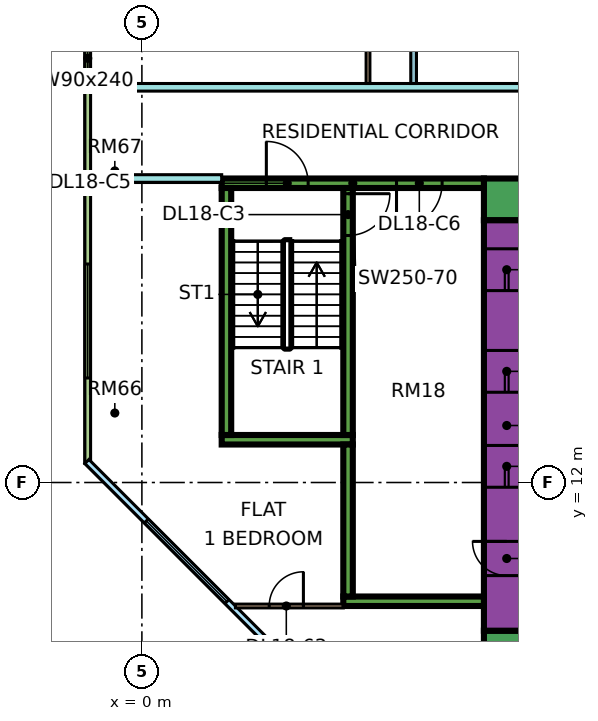
"""IFC4 building model, lengths in metres.
Left out: names, types, materials, properties, quantities, classifications, styles, units other than length and angle.
Written with IfcOpenShell. Run it as: python <this file> out.ifc"""

import sys

from ifc_helpers import new_model, si_unit, direction, frame, frame_2d, origin, place, context, subcontext, project, spatial, rectangle, extrude, element, fill, save


model = new_model("IFC4")
c1 = context("Model", 3, precision=1e-05, world=origin(), true_north=direction((0.0, 1.0)))
c2 = subcontext(c1, "Body", "Model", "MODEL_VIEW")
j1 = project(units=[si_unit("LENGTHUNIT", "METRE"), si_unit("PLANEANGLEUNIT", "RADIAN")], contexts=[c1])
p1 = place(None, origin())
s1 = spatial("IfcSite", under=j1, at=p1, CompositionType="ELEMENT")
p2 = place(p1, origin())
s2 = spatial("IfcBuilding", under=s1, at=p2, CompositionType="ELEMENT")
p3 = place(p2, frame((0.0, 0.0, 82.65)))
s3 = spatial("IfcBuildingStorey", under=s2, at=p3, CompositionType="ELEMENT", Elevation=82.65)
p4 = place(p3, frame((9.0, 7.55, 0.0), z_axis=(0.0, 0.0, 1.0), x_axis=(1.0, 0.0, 0.0)))
e1 = element("IfcWall", 1, at=p4, inside=s3, PredefinedType="SHEAR", context=c2, shape_type="SweptSolid", body=[
    extrude(rectangle(XDim=25.0, YDim=1.1, at=frame_2d((12.5, 0.0))), origin(), (0.0, 0.0, 1.0), 3.75),
])
p5 = place(p3, frame((9.0, 19.45, 0.0), z_axis=(0.0, 0.0, 1.0), x_axis=(1.0, 0.0, 0.0)))
e2 = element("IfcWall", 2, at=p5, inside=s3, PredefinedType="SHEAR", context=c2, shape_type="SweptSolid", body=[
    extrude(rectangle(XDim=25.0, YDim=1.1, at=frame_2d((12.5, 0.0))), origin(), (0.0, 0.0, 1.0), 3.75),
])
p6 = place(p5, frame((19.1, 0.0, 0.0)))
e3 = element("IfcOpeningElement", 3, at=p6, cuts=e2, PredefinedType="OPENING", context=c2, shape_type="SweptSolid", body=[
    extrude(rectangle(XDim=1.8, YDim=2.4, at=frame_2d((0.9, 1.2))), frame((0.0, 0.56, 0.0), z_axis=(0.0, -1.0, 0.0), x_axis=(1.0, 0.0, 0.0)), (0.0, 0.0, 1.0), 1.12),
])
p7 = place(p3, frame((9.6, 8.1, 0.0), z_axis=(0.0, 0.0, 1.0), x_axis=(0.0, 1.0, 0.0)))
e4 = element("IfcWall", 4, at=p7, inside=s3, PredefinedType="SHEAR", context=c2, shape_type="SweptSolid", body=[
    extrude(rectangle(XDim=10.8, YDim=1.2, at=frame_2d((5.4, 0.0))), origin(), (0.0, 0.0, 1.0), 3.75),
])
p8 = place(p7, frame((3.775, 0.0, 0.0)))
e5 = element("IfcOpeningElement", 5, at=p8, cuts=e4, PredefinedType="OPENING", context=c2, shape_type="SweptSolid", body=[
    extrude(rectangle(XDim=1.1, YDim=2.2, at=frame_2d((0.55, 1.1))), frame((0.0, 0.61, 0.0), z_axis=(0.0, -1.0, 0.0), x_axis=(1.0, 0.0, 0.0)), (0.0, 0.0, 1.0), 1.22),
])
p9 = place(p7, frame((6.275, 0.0, 0.0)))
e6 = element("IfcOpeningElement", 6, at=p9, cuts=e4, PredefinedType="OPENING", context=c2, shape_type="SweptSolid", body=[
    extrude(rectangle(XDim=1.1, YDim=2.2, at=frame_2d((0.55, 1.1))), frame((0.0, 0.61, 0.0), z_axis=(0.0, -1.0, 0.0), x_axis=(1.0, 0.0, 0.0)), (0.0, 0.0, 1.0), 1.22),
])
p10 = place(p7, frame((8.95, 0.0, 0.0)))
e7 = element("IfcOpeningElement", 7, at=p10, cuts=e4, PredefinedType="OPENING", context=c2, shape_type="SweptSolid", body=[
    extrude(rectangle(XDim=1.1, YDim=2.2, at=frame_2d((0.55, 1.1))), frame((0.0, 0.61, 0.0), z_axis=(0.0, -1.0, 0.0), x_axis=(1.0, 0.0, 0.0)), (0.0, 0.0, 1.0), 1.22),
])
p11 = place(p7, frame((1.45, 0.0, 0.0)))
e8 = element("IfcOpeningElement", 8, at=p11, cuts=e4, PredefinedType="OPENING", context=c2, shape_type="SweptSolid", body=[
    extrude(rectangle(XDim=0.9, YDim=2.1, at=frame_2d((0.45, 1.05))), frame((0.0, 0.61, 0.0), z_axis=(0.0, -1.0, 0.0), x_axis=(1.0, 0.0, 0.0)), (0.0, 0.0, 1.0), 1.22),
])
p12 = place(p3, frame((2.1, 19.875, 0.0), z_axis=(0.0, 0.0, 1.0), x_axis=(1.0, 0.0, 0.0)))
e9 = element("IfcWall", 9, at=p12, inside=s3, PredefinedType="SHEAR", context=c2, shape_type="SweptSolid", body=[
    extrude(rectangle(XDim=6.9, YDim=0.25, at=frame_2d((3.45, 0.0))), origin(), (0.0, 0.0, 1.0), 3.75),
])
p13 = place(p12, frame((1.175, 0.0, 0.0)))
e10 = element("IfcOpeningElement", 10, at=p13, cuts=e9, PredefinedType="OPENING", context=c2, shape_type="SweptSolid", body=[
    extrude(rectangle(XDim=1.1, YDim=2.2, at=frame_2d((0.55, 1.1))), frame((0.0, 0.135, 0.0), z_axis=(0.0, -1.0, 0.0), x_axis=(1.0, 0.0, 0.0)), (0.0, 0.0, 1.0), 0.27),
])
p14 = place(p12, frame((4.6, 0.0, 0.0)))
e11 = element("IfcOpeningElement", 11, at=p14, cuts=e9, PredefinedType="OPENING", context=c2, shape_type="SweptSolid", body=[
    extrude(rectangle(XDim=1.2, YDim=2.2, at=frame_2d((0.6, 1.1))), frame((0.0, 0.135, 0.0), z_axis=(0.0, -1.0, 0.0), x_axis=(1.0, 0.0, 0.0)), (0.0, 0.0, 1.0), 0.27),
])
p15 = place(p3, frame((2.1, 13.125, 0.0), z_axis=(0.0, 0.0, 1.0), x_axis=(1.0, 0.0, 0.0)))
e12 = element("IfcWall", 12, at=p15, inside=s3, PredefinedType="SHEAR", context=c2, shape_type="SweptSolid", body=[
    extrude(rectangle(XDim=3.45, YDim=0.25, at=frame_2d((1.725, 0.0))), origin(), (0.0, 0.0, 1.0), 3.75),
])
p16 = place(p3, frame((2.225, 13.25, 0.0), z_axis=(0.0, 0.0, 1.0), x_axis=(0.0, 1.0, 0.0)))
e13 = element("IfcWall", 13, at=p16, inside=s3, PredefinedType="SHEAR", context=c2, shape_type="SweptSolid", body=[
    extrude(rectangle(XDim=6.5, YDim=0.25, at=frame_2d((3.25, 0.0))), origin(), (0.0, 0.0, 1.0), 3.75),
])
p17 = place(p3, frame((5.425, 13.25, 0.0), z_axis=(0.0, 0.0, 1.0), x_axis=(0.0, 1.0, 0.0)))
e14 = element("IfcWall", 14, at=p17, inside=s3, PredefinedType="SHEAR", context=c2, shape_type="SweptSolid", body=[
    extrude(rectangle(XDim=6.5, YDim=0.25, at=frame_2d((3.25, 0.0))), origin(), (0.0, 0.0, 1.0), 3.75),
])
p18 = place(p17, frame((5.25, 0.0, 0.0)))
e15 = element("IfcOpeningElement", 15, at=p18, cuts=e14, PredefinedType="OPENING", context=c2, shape_type="SweptSolid", body=[
    extrude(rectangle(XDim=1.1, YDim=2.2, at=frame_2d((0.55, 1.1))), frame((0.0, 0.135, 0.0), z_axis=(0.0, -1.0, 0.0), x_axis=(1.0, 0.0, 0.0)), (0.0, 0.0, 1.0), 0.27),
])
p19 = place(p3, frame((5.3, 8.875, 0.0), z_axis=(0.0, 0.0, 1.0), x_axis=(1.0, 0.0, 0.0)))
e16 = element("IfcWall", 16, at=p19, inside=s3, PredefinedType="SHEAR", context=c2, shape_type="SweptSolid", body=[
    extrude(rectangle(XDim=3.7, YDim=0.25, at=frame_2d((1.85, 0.0))), origin(), (0.0, 0.0, 1.0), 3.75),
])
p20 = place(p3, frame((5.425, 9.0, 0.0), z_axis=(0.0, 0.0, 1.0), x_axis=(0.0, 1.0, 0.0)))
e17 = element("IfcWall", 17, at=p20, inside=s3, PredefinedType="SHEAR", context=c2, shape_type="SweptSolid", body=[
    extrude(rectangle(XDim=4.0, YDim=0.25, at=frame_2d((2.0, 0.0))), origin(), (0.0, 0.0, 1.0), 3.75),
])
p21 = place(p3, frame((-1.425, 23.925, 0.0), z_axis=(0.0, 0.0, 1.0), x_axis=(0.0, -1.0, 0.0)))
e18 = element("IfcWall", 18, at=p21, inside=s3, PredefinedType="SOLIDWALL", context=c2, shape_type="SweptSolid", body=[
    extrude(rectangle(XDim=11.425, YDim=0.15, at=frame_2d((5.712, 0.0))), origin(), (0.0, 0.0, 1.0), 3.3),
])
p22 = place(p21, frame((0.312, 0.0, 0.45)))
e19 = element("IfcOpeningElement", 19, at=p22, cuts=e18, PredefinedType="OPENING", context=c2, shape_type="SweptSolid", body=[
    extrude(rectangle(XDim=0.9, YDim=2.4, at=frame_2d((0.45, 1.2))), frame((0.0, 0.085, 0.0), z_axis=(0.0, -1.0, 0.0), x_axis=(1.0, 0.0, 0.0)), (0.0, 0.0, 1.0), 0.17),
])
p23 = place(p21, frame((6.175, 0.0, 0.45)))
e20 = element("IfcOpeningElement", 20, at=p23, cuts=e18, PredefinedType="OPENING", context=c2, shape_type="SweptSolid", body=[
    extrude(rectangle(XDim=3.0, YDim=2.4, at=frame_2d((1.5, 1.2))), frame((0.0, 0.085, 0.0), z_axis=(0.0, -1.0, 0.0), x_axis=(1.0, 0.0, 0.0)), (0.0, 0.0, 1.0), 0.17),
])
p24 = place(p3, frame((-1.447, 12.553, 0.0), z_axis=(0.0, 0.0, 1.0), x_axis=(0.707106781187, -0.707106781187, 0.0)))
e21 = element("IfcWall", 21, at=p24, inside=s3, PredefinedType="SOLIDWALL", context=c2, shape_type="SweptSolid", body=[
    extrude(rectangle(XDim=19.799, YDim=0.15, at=frame_2d((9.899, 0.0))), origin(), (0.0, 0.0, 1.0), 3.3),
])
p25 = place(p24, frame((2.212, 0.0, 0.45)))
e22 = element("IfcOpeningElement", 22, at=p25, cuts=e21, PredefinedType="OPENING", context=c2, shape_type="SweptSolid", body=[
    extrude(rectangle(XDim=3.0, YDim=2.4, at=frame_2d((1.5, 1.2))), frame((0.0, 0.085, 0.0), z_axis=(0.0, -1.0, 0.0), x_axis=(1.0, 0.0, 0.0)), (0.0, 0.0, 1.0), 0.17),
])
p26 = place(p24, frame((10.216, 0.0, 0.45)))
e23 = element("IfcOpeningElement", 23, at=p26, cuts=e21, PredefinedType="OPENING", context=c2, shape_type="SweptSolid", body=[
    extrude(rectangle(XDim=3.0, YDim=2.4, at=frame_2d((1.5, 1.2))), frame((0.0, 0.085, 0.0), z_axis=(0.0, -1.0, 0.0), x_axis=(1.0, 0.0, 0.0)), (0.0, 0.0, 1.0), 0.17),
])
p27 = place(p3, frame((-1.35, 20.0, 0.0), z_axis=(0.0, 0.0, 1.0), x_axis=(1.0, 0.0, 0.0)))
e24 = element("IfcWall", 24, at=p27, inside=s3, PredefinedType="PARTITIONING", context=c2, shape_type="SweptSolid", body=[
    extrude(rectangle(XDim=3.45, YDim=0.2, at=frame_2d((1.725, 0.0))), origin(), (0.0, 0.0, 1.0), 3.3),
])
p28 = place(p3, frame((-1.35, 22.4, 0.0), z_axis=(0.0, 0.0, 1.0), x_axis=(1.0, 0.0, 0.0)))
e25 = element("IfcWall", 25, at=p28, inside=s3, PredefinedType="PARTITIONING", context=c2, shape_type="SweptSolid", body=[
    extrude(rectangle(XDim=13.8, YDim=0.2, at=frame_2d((6.9, 0.0))), origin(), (0.0, 0.0, 1.0), 3.3),
])
p29 = place(p3, frame((2.461, 8.75, 0.0), z_axis=(0.0, 0.0, 1.0), x_axis=(1.0, 0.0, 0.0)))
e26 = element("IfcWall", 26, at=p29, inside=s3, PredefinedType="PARTITIONING", context=c2, shape_type="SweptSolid", body=[
    extrude(rectangle(XDim=2.839, YDim=0.1, at=frame_2d((1.419, 0.0))), origin(), (0.0, 0.0, 1.0), 3.3),
])
p30 = place(p29, frame((0.889, 0.0, 0.0)))
e27 = element("IfcOpeningElement", 27, at=p30, cuts=e26, PredefinedType="OPENING", context=c2, shape_type="SweptSolid", body=[
    extrude(rectangle(XDim=0.9, YDim=2.1, at=frame_2d((0.45, 1.05))), frame((0.0, 0.06, 0.0), z_axis=(0.0, -1.0, 0.0), x_axis=(1.0, 0.0, 0.0)), (0.0, 0.0, 1.0), 0.12),
])
p31 = place(p3, frame((5.95, 22.5, 0.0), z_axis=(0.0, 0.0, 1.0), x_axis=(0.0, 1.0, 0.0)))
e28 = element("IfcWall", 28, at=p31, inside=s3, PredefinedType="PARTITIONING", context=c2, shape_type="SweptSolid", body=[
    extrude(rectangle(XDim=4.45, YDim=0.1, at=frame_2d((2.225, 0.0))), origin(), (0.0, 0.0, 1.0), 3.3),
])
p32 = place(p3, frame((7.15, 22.5, 0.0), z_axis=(0.0, 0.0, 1.0), x_axis=(0.0, 1.0, 0.0)))
e29 = element("IfcWall", 29, at=p32, inside=s3, PredefinedType="PARTITIONING", context=c2, shape_type="SweptSolid", body=[
    extrude(rectangle(XDim=10.875, YDim=0.15, at=frame_2d((5.438, 0.0))), origin(), (0.0, 0.0, 1.0), 3.3),
])
p33 = place(p32, frame((8.55, 0.0, 0.0)))
e30 = element("IfcOpeningElement", 30, at=p33, cuts=e29, PredefinedType="OPENING", context=c2, shape_type="SweptSolid", body=[
    extrude(rectangle(XDim=0.8, YDim=2.1, at=frame_2d((0.4, 1.05))), frame((0.0, 0.085, 0.0), z_axis=(0.0, -1.0, 0.0), x_axis=(1.0, 0.0, 0.0)), (0.0, 0.0, 1.0), 0.17),
])
p34 = place(p32, frame((3.05, 0.0, 0.0)))
e31 = element("IfcOpeningElement", 31, at=p34, cuts=e29, PredefinedType="OPENING", context=c2, shape_type="SweptSolid", body=[
    extrude(rectangle(XDim=0.9, YDim=2.1, at=frame_2d((0.45, 1.05))), frame((0.0, 0.085, 0.0), z_axis=(0.0, -1.0, 0.0), x_axis=(1.0, 0.0, 0.0)), (0.0, 0.0, 1.0), 0.17),
])
p35 = place(p22, origin())
e32 = element("IfcWindow", 32, at=p35, inside=s3, PartitioningType="SINGLE_PANEL", PredefinedType="WINDOW", context=c2, shape_type="SweptSolid", body=[
    extrude(rectangle(XDim=0.9, YDim=2.4, at=frame_2d((0.45, 1.2))), frame((0.0, 0.03, 0.0), z_axis=(0.0, -1.0, 0.0), x_axis=(1.0, 0.0, 0.0)), (0.0, 0.0, 1.0), 0.06),
])
fill(e19, e32)
p36 = place(p23, origin())
e33 = element("IfcWindow", 33, at=p36, inside=s3, PartitioningType="SINGLE_PANEL", PredefinedType="WINDOW", context=c2, shape_type="SweptSolid", body=[
    extrude(rectangle(XDim=3.0, YDim=2.4, at=frame_2d((1.5, 1.2))), frame((0.0, 0.03, 0.0), z_axis=(0.0, -1.0, 0.0), x_axis=(1.0, 0.0, 0.0)), (0.0, 0.0, 1.0), 0.06),
])
fill(e20, e33)
p37 = place(p25, origin())
e34 = element("IfcWindow", 34, at=p37, inside=s3, PartitioningType="SINGLE_PANEL", PredefinedType="WINDOW", context=c2, shape_type="SweptSolid", body=[
    extrude(rectangle(XDim=3.0, YDim=2.4, at=frame_2d((1.5, 1.2))), frame((0.0, 0.03, 0.0), z_axis=(0.0, -1.0, 0.0), x_axis=(1.0, 0.0, 0.0)), (0.0, 0.0, 1.0), 0.06),
])
fill(e22, e34)
p38 = place(p8, origin())
e35 = element("IfcDoor", 35, at=p38, inside=s3, OperationType="DOUBLE_DOOR_SLIDING", PredefinedType="DOOR", context=c2, shape_type="SweptSolid", body=[
    extrude(rectangle(XDim=1.1, YDim=2.2, at=frame_2d((0.55, 1.1))), frame((0.0, 0.025, 0.0), z_axis=(0.0, -1.0, 0.0), x_axis=(1.0, 0.0, 0.0)), (0.0, 0.0, 1.0), 0.05),
])
fill(e5, e35)
p39 = place(p9, origin())
e36 = element("IfcDoor", 36, at=p39, inside=s3, OperationType="DOUBLE_DOOR_SLIDING", PredefinedType="DOOR", context=c2, shape_type="SweptSolid", body=[
    extrude(rectangle(XDim=1.1, YDim=2.2, at=frame_2d((0.55, 1.1))), frame((0.0, 0.025, 0.0), z_axis=(0.0, -1.0, 0.0), x_axis=(1.0, 0.0, 0.0)), (0.0, 0.0, 1.0), 0.05),
])
fill(e6, e36)
p40 = place(p10, origin())
e37 = element("IfcDoor", 37, at=p40, inside=s3, OperationType="DOUBLE_DOOR_SLIDING", PredefinedType="DOOR", context=c2, shape_type="SweptSolid", body=[
    extrude(rectangle(XDim=1.1, YDim=2.2, at=frame_2d((0.55, 1.1))), frame((0.0, 0.025, 0.0), z_axis=(0.0, -1.0, 0.0), x_axis=(1.0, 0.0, 0.0)), (0.0, 0.0, 1.0), 0.05),
])
fill(e7, e37)
p41 = place(p18, origin())
e38 = element("IfcDoor", 38, at=p41, inside=s3, OperationType="SINGLE_SWING_RIGHT", PredefinedType="DOOR", context=c2, shape_type="SweptSolid", body=[
    extrude(rectangle(XDim=1.1, YDim=2.2, at=frame_2d((0.55, 1.1))), frame((0.0, 0.025, 0.0), z_axis=(0.0, -1.0, 0.0), x_axis=(1.0, 0.0, 0.0)), (0.0, 0.0, 1.0), 0.05),
])
fill(e15, e38)
p42 = place(p11, frame((0.9, 0.0, 0.0), z_axis=(0.0, 0.0, 1.0), x_axis=(-1.0, 0.0, 0.0)))
e39 = element("IfcDoor", 39, at=p42, inside=s3, OperationType="SINGLE_SWING_RIGHT", PredefinedType="DOOR", context=c2, shape_type="SweptSolid", body=[
    extrude(rectangle(XDim=0.9, YDim=2.1, at=frame_2d((0.45, 1.05))), frame((0.0, 0.025, 0.0), z_axis=(0.0, -1.0, 0.0), x_axis=(1.0, 0.0, 0.0)), (0.0, 0.0, 1.0), 0.05),
])
fill(e8, e39)
p43 = place(p13, origin())
e40 = element("IfcDoor", 40, at=p43, inside=s3, OperationType="SINGLE_SWING_LEFT", PredefinedType="DOOR", context=c2, shape_type="SweptSolid", body=[
    extrude(rectangle(XDim=1.1, YDim=2.2, at=frame_2d((0.55, 1.1))), frame((0.0, 0.025, 0.0), z_axis=(0.0, -1.0, 0.0), x_axis=(1.0, 0.0, 0.0)), (0.0, 0.0, 1.0), 0.05),
])
fill(e10, e40)
p44 = place(p14, frame((1.2, 0.0, 0.0), z_axis=(0.0, 0.0, 1.0), x_axis=(-1.0, 0.0, 0.0)))
e41 = element("IfcDoor", 41, at=p44, inside=s3, OperationType="SINGLE_SWING_LEFT", PredefinedType="DOOR", context=c2, shape_type="SweptSolid", body=[
    extrude(rectangle(XDim=1.2, YDim=2.2, at=frame_2d((0.6, 1.1))), frame((0.0, 0.025, 0.0), z_axis=(0.0, -1.0, 0.0), x_axis=(1.0, 0.0, 0.0)), (0.0, 0.0, 1.0), 0.05),
])
fill(e11, e41)
p45 = place(p30, frame((0.9, 0.0, 0.0), z_axis=(0.0, 0.0, 1.0), x_axis=(-1.0, 0.0, 0.0)))
e42 = element("IfcDoor", 42, at=p45, inside=s3, OperationType="SINGLE_SWING_RIGHT", PredefinedType="DOOR", context=c2, shape_type="SweptSolid", body=[
    extrude(rectangle(XDim=0.9, YDim=2.1, at=frame_2d((0.45, 1.05))), frame((0.0, 0.025, 0.0), z_axis=(0.0, -1.0, 0.0), x_axis=(1.0, 0.0, 0.0)), (0.0, 0.0, 1.0), 0.05),
])
fill(e27, e42)
save(model, sys.argv[1])
